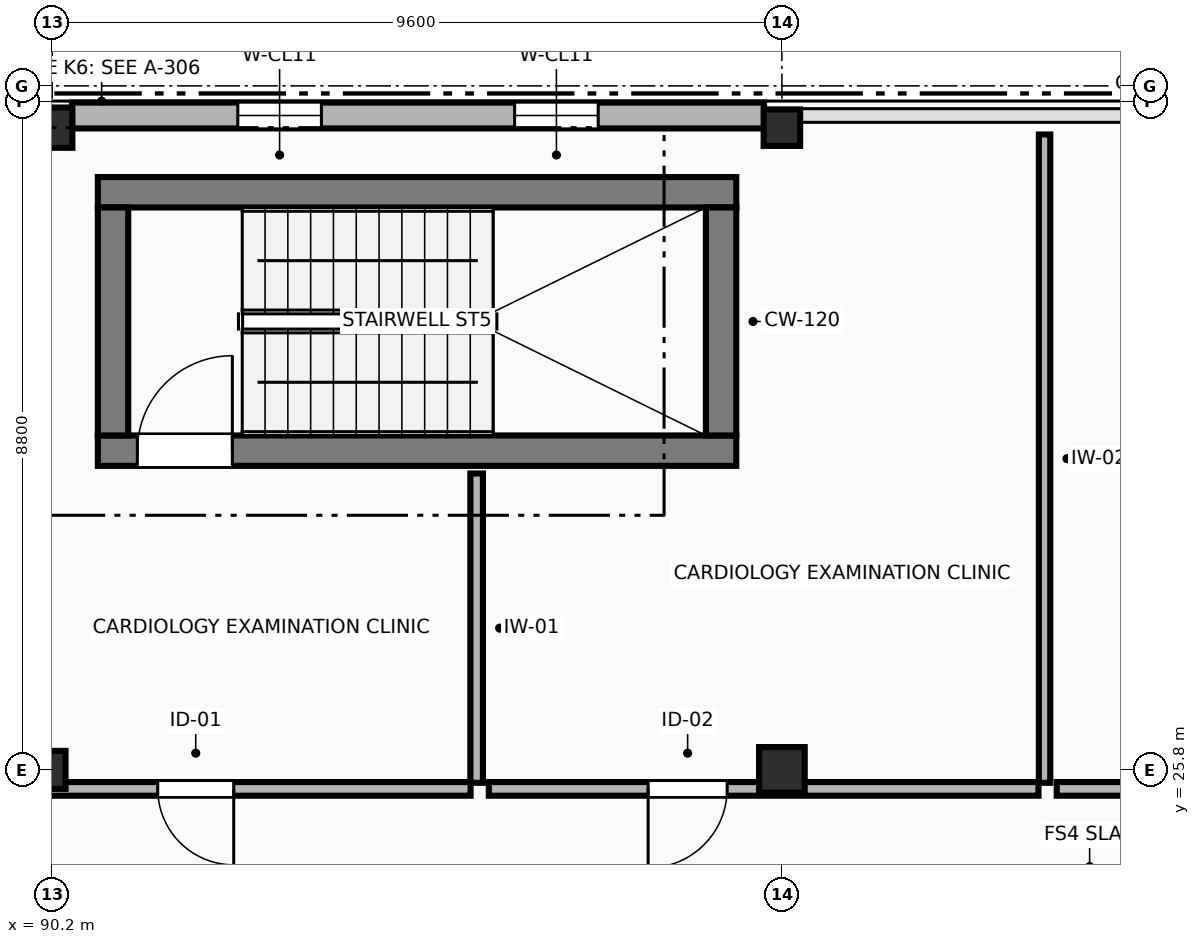
"""IFC4 building model, lengths in metres.
Left out: names, types, materials, properties, quantities, classifications, styles, units other than length and angle.
Written with IfcOpenShell. Run it as: python <this file> out.ifc"""

import sys

from ifc_helpers import new_model, si_unit, direction, frame, frame_2d, origin, origin_2d, place, context, subcontext, project, spatial, rectangle, extrude, element, fill, save


model = new_model("IFC4")
c1 = context("Model", 3, precision=1e-05, world=origin(), true_north=direction((0.0, 1.0)))
c2 = subcontext(c1, "Body", "Model", "MODEL_VIEW")
j1 = project(units=[si_unit("LENGTHUNIT", "METRE"), si_unit("PLANEANGLEUNIT", "RADIAN")], contexts=[c1])
p1 = place(None, origin())
s1 = spatial("IfcSite", under=j1, at=p1, CompositionType="ELEMENT")
p2 = place(p1, origin())
s2 = spatial("IfcBuilding", under=s1, at=p2, CompositionType="ELEMENT")
p3 = place(p2, frame((0.0, 0.0, 9.6)))
s3 = spatial("IfcBuildingStorey", under=s2, at=p3, CompositionType="ELEMENT", Elevation=9.6)
p4 = place(p3, frame((90.2, 25.8, 0.0), z_axis=(0.0, 0.0, 1.0), x_axis=(1.0, 0.0, 0.0)))
e1 = element("IfcColumn", 1, at=p4, inside=s3, PredefinedType="COLUMN", context=c2, shape_type="SweptSolid", body=[
    extrude(rectangle(XDim=0.35, YDim=0.5, at=origin_2d()), origin(), (0.0, 0.0, 1.0), 4.2),
])
p5 = place(p3, frame((90.2, 34.25, 0.0), z_axis=(0.0, 0.0, 1.0), x_axis=(1.0, 0.0, 0.0)))
e2 = element("IfcColumn", 2, at=p5, inside=s3, PredefinedType="COLUMN", context=c2, shape_type="SweptSolid", body=[
    extrude(rectangle(XDim=0.53, YDim=0.53, at=origin_2d()), origin(), (0.0, 0.0, 1.0), 4.2),
])
p6 = place(p3, frame((99.8, 25.8, 0.0), z_axis=(0.0, 0.0, 1.0), x_axis=(1.0, 0.0, 0.0)))
e3 = element("IfcColumn", 3, at=p6, inside=s3, PredefinedType="COLUMN", context=c2, shape_type="SweptSolid", body=[
    extrude(rectangle(XDim=0.6, YDim=0.6, at=origin_2d()), origin(), (0.0, 0.0, 1.0), 4.2),
])
p7 = place(p3, frame((99.8, 34.25, 0.0), z_axis=(0.0, 0.0, 1.0), x_axis=(1.0, 0.0, 0.0)))
e4 = element("IfcColumn", 4, at=p7, inside=s3, PredefinedType="COLUMN", context=c2, shape_type="SweptSolid", body=[
    extrude(rectangle(XDim=0.48, YDim=0.48, at=origin_2d()), origin(), (0.0, 0.0, 1.0), 4.2),
])
p8 = place(p3, frame((99.565, 34.41, 0.0), z_axis=(0.0, 0.0, 1.0), x_axis=(-1.0, 0.0, 0.0)))
e5 = element("IfcWall", 5, at=p8, inside=s3, PredefinedType="STANDARD", context=c2, shape_type="SweptSolid", body=[
    extrude(rectangle(XDim=9.105, YDim=0.34, at=frame_2d((4.552, 0.0))), origin(), (0.0, 0.0, 1.0), 3.185),
])
p9 = place(p8, frame((2.181, 0.0, 0.95)))
e6 = element("IfcOpeningElement", 6, at=p9, cuts=e5, PredefinedType="OPENING", context=c2, shape_type="SweptSolid", body=[
    extrude(rectangle(XDim=1.1, YDim=1.4, at=frame_2d((0.55, 0.7))), frame((0.0, 0.18, 0.0), z_axis=(0.0, -1.0, 0.0), x_axis=(1.0, 0.0, 0.0)), (0.0, 0.0, 1.0), 0.36),
])
p10 = place(p8, frame((5.823, 0.0, 0.95)))
e7 = element("IfcOpeningElement", 7, at=p10, cuts=e5, PredefinedType="OPENING", context=c2, shape_type="SweptSolid", body=[
    extrude(rectangle(XDim=1.1, YDim=1.4, at=frame_2d((0.55, 0.7))), frame((0.0, 0.18, 0.0), z_axis=(0.0, -1.0, 0.0), x_axis=(1.0, 0.0, 0.0)), (0.0, 0.0, 1.0), 0.36),
])
p11 = place(p3, frame((90.8, 30.0, 0.0), z_axis=(0.0, 0.0, 1.0), x_axis=(1.0, 0.0, 0.0)))
e8 = element("IfcWall", 8, at=p11, inside=s3, PredefinedType="SHEAR", context=c2, shape_type="SweptSolid", body=[
    extrude(rectangle(XDim=8.4, YDim=0.4, at=frame_2d((4.2, 0.0))), origin(), (0.0, 0.0, 1.0), 3.92),
])
p12 = place(p11, frame((0.52, 0.0, 0.0)))
e9 = element("IfcOpeningElement", 9, at=p12, cuts=e8, PredefinedType="OPENING", context=c2, shape_type="SweptSolid", body=[
    extrude(rectangle(XDim=1.25, YDim=2.2, at=frame_2d((0.625, 1.1))), frame((0.0, 0.21, 0.0), z_axis=(0.0, -1.0, 0.0), x_axis=(1.0, 0.0, 0.0)), (0.0, 0.0, 1.0), 0.42),
])
p13 = place(p3, frame((99.2, 33.4, 0.0), z_axis=(0.0, 0.0, 1.0), x_axis=(-1.0, 0.0, 0.0)))
e10 = element("IfcWall", 10, at=p13, inside=s3, PredefinedType="SHEAR", context=c2, shape_type="SweptSolid", body=[
    extrude(rectangle(XDim=8.4, YDim=0.4, at=frame_2d((4.2, 0.0))), origin(), (0.0, 0.0, 1.0), 3.92),
])
for number, where, z_axis, x_axis in (
    (11, (91.0, 30.2, 0.0), (0.0, 0.0, 1.0), (0.0, 1.0, 0.0)),
    (12, (99.0, 33.2, 0.0), (0.0, 0.0, 1.0), (0.0, -1.0, 0.0)),
):
    element("IfcWall", number, at=place(p3, frame(where, z_axis=z_axis, x_axis=x_axis)), inside=s3, PredefinedType="SHEAR", context=c2, shape_type="SweptSolid", body=[
        extrude(rectangle(XDim=3.0, YDim=0.4, at=frame_2d((1.5, 0.0))), origin(), (0.0, 0.0, 1.0), 3.92),
    ])
p14 = place(p3, frame((95.784, 29.7, 0.0), z_axis=(0.0, 0.0, 1.0), x_axis=(0.0, -1.0, 0.0)))
e13 = element("IfcWall", 13, at=p14, inside=s3, PredefinedType="PARTITIONING", context=c2, shape_type="SweptSolid", body=[
    extrude(rectangle(XDim=4.07, YDim=0.165, at=frame_2d((2.035, 0.0))), origin(), (0.0, 0.0, 1.0), 3.92),
])
p15 = place(p3, frame((95.704, 25.55, 0.0), z_axis=(0.0, 0.0, 1.0), x_axis=(-1.0, 0.0, 0.0)))
e14 = element("IfcWall", 14, at=p15, inside=s3, PredefinedType="PARTITIONING", context=c2, shape_type="SweptSolid", body=[
    extrude(rectangle(XDim=7.232, YDim=0.18, at=frame_2d((3.616, 0.0))), origin(), (0.0, 0.0, 1.0), 3.225),
])
p16 = place(p15, frame((3.116, 0.0, 0.0)))
e15 = element("IfcOpeningElement", 15, at=p16, cuts=e14, PredefinedType="OPENING", context=c2, shape_type="SweptSolid", body=[
    extrude(rectangle(XDim=1.0, YDim=2.15, at=frame_2d((0.5, 1.075))), frame((0.0, 0.1, 0.0), z_axis=(0.0, -1.0, 0.0), x_axis=(1.0, 0.0, 0.0)), (0.0, 0.0, 1.0), 0.2),
])
p17 = place(p3, frame((103.256, 34.16, 0.0), z_axis=(0.0, 0.0, 1.0), x_axis=(0.0, -1.0, 0.0)))
e16 = element("IfcWall", 16, at=p17, inside=s3, PredefinedType="PARTITIONING", context=c2, shape_type="SweptSolid", body=[
    extrude(rectangle(XDim=8.53, YDim=0.15, at=frame_2d((4.265, 0.0))), origin(), (0.0, 0.0, 1.0), 3.643),
])
p18 = place(p3, frame((103.176, 25.55, 0.0), z_axis=(0.0, 0.0, 1.0), x_axis=(-1.0, 0.0, 0.0)))
e17 = element("IfcWall", 17, at=p18, inside=s3, PredefinedType="PARTITIONING", context=c2, shape_type="SweptSolid", body=[
    extrude(rectangle(XDim=7.232, YDim=0.18, at=frame_2d((3.616, 0.0))), origin(), (0.0, 0.0, 1.0), 3.225),
])
p19 = place(p18, frame((4.096, 0.0, 0.0)))
e18 = element("IfcOpeningElement", 18, at=p19, cuts=e17, PredefinedType="OPENING", context=c2, shape_type="SweptSolid", body=[
    extrude(rectangle(XDim=1.04, YDim=2.15, at=frame_2d((0.52, 1.075))), frame((0.0, 0.1, 0.0), z_axis=(0.0, -1.0, 0.0), x_axis=(1.0, 0.0, 0.0)), (0.0, 0.0, 1.0), 0.2),
])
p20 = place(p3, frame((110.648, 25.55, 0.0), z_axis=(0.0, 0.0, 1.0), x_axis=(-1.0, 0.0, 0.0)))
e19 = element("IfcWall", 19, at=p20, inside=s3, PredefinedType="PARTITIONING", context=c2, shape_type="SweptSolid", body=[
    extrude(rectangle(XDim=7.232, YDim=0.18, at=frame_2d((3.616, 0.0))), origin(), (0.0, 0.0, 1.0), 3.225),
])
p21 = place(p20, frame((3.136, 0.0, 0.0)))
e20 = element("IfcOpeningElement", 20, at=p21, cuts=e19, PredefinedType="OPENING", context=c2, shape_type="SweptSolid", body=[
    extrude(rectangle(XDim=0.96, YDim=2.1, at=frame_2d((0.48, 1.05))), frame((0.0, 0.1, 0.0), z_axis=(0.0, -1.0, 0.0), x_axis=(1.0, 0.0, 0.0)), (0.0, 0.0, 1.0), 0.2),
])
p22 = place(p9, origin())
e21 = element("IfcWindow", 21, at=p22, inside=s3, PartitioningType="SINGLE_PANEL", PredefinedType="WINDOW", context=c2, shape_type="SweptSolid", body=[
    extrude(rectangle(XDim=1.1, YDim=1.4, at=frame_2d((0.55, 0.7))), frame((0.0, 0.03, 0.0), z_axis=(0.0, -1.0, 0.0), x_axis=(1.0, 0.0, 0.0)), (0.0, 0.0, 1.0), 0.06),
])
fill(e6, e21)
p23 = place(p10, origin())
e22 = element("IfcWindow", 22, at=p23, inside=s3, PartitioningType="SINGLE_PANEL", PredefinedType="WINDOW", context=c2, shape_type="SweptSolid", body=[
    extrude(rectangle(XDim=1.1, YDim=1.4, at=frame_2d((0.55, 0.7))), frame((0.0, 0.03, 0.0), z_axis=(0.0, -1.0, 0.0), x_axis=(1.0, 0.0, 0.0)), (0.0, 0.0, 1.0), 0.06),
])
fill(e7, e22)
p24 = place(p12, origin())
e23 = element("IfcDoor", 23, at=p24, inside=s3, OperationType="SINGLE_SWING_RIGHT", PredefinedType="DOOR", context=c2, shape_type="SweptSolid", body=[
    extrude(rectangle(XDim=1.25, YDim=2.2, at=frame_2d((0.625, 1.1))), frame((0.0, 0.025, 0.0), z_axis=(0.0, -1.0, 0.0), x_axis=(1.0, 0.0, 0.0)), (0.0, 0.0, 1.0), 0.05),
])
fill(e9, e23)
p25 = place(p16, origin())
e24 = element("IfcDoor", 24, at=p25, inside=s3, OperationType="SINGLE_SWING_LEFT", PredefinedType="DOOR", context=c2, shape_type="SweptSolid", body=[
    extrude(rectangle(XDim=1.0, YDim=2.15, at=frame_2d((0.5, 1.075))), frame((0.0, 0.025, 0.0), z_axis=(0.0, -1.0, 0.0), x_axis=(1.0, 0.0, 0.0)), (0.0, 0.0, 1.0), 0.05),
])
fill(e15, e24)
p26 = place(p19, origin())
e25 = element("IfcDoor", 25, at=p26, inside=s3, OperationType="SINGLE_SWING_RIGHT", PredefinedType="DOOR", context=c2, shape_type="SweptSolid", body=[
    extrude(rectangle(XDim=1.04, YDim=2.15, at=frame_2d((0.52, 1.075))), frame((0.0, 0.025, 0.0), z_axis=(0.0, -1.0, 0.0), x_axis=(1.0, 0.0, 0.0)), (0.0, 0.0, 1.0), 0.05),
])
fill(e18, e25)
save(model, sys.argv[1])
